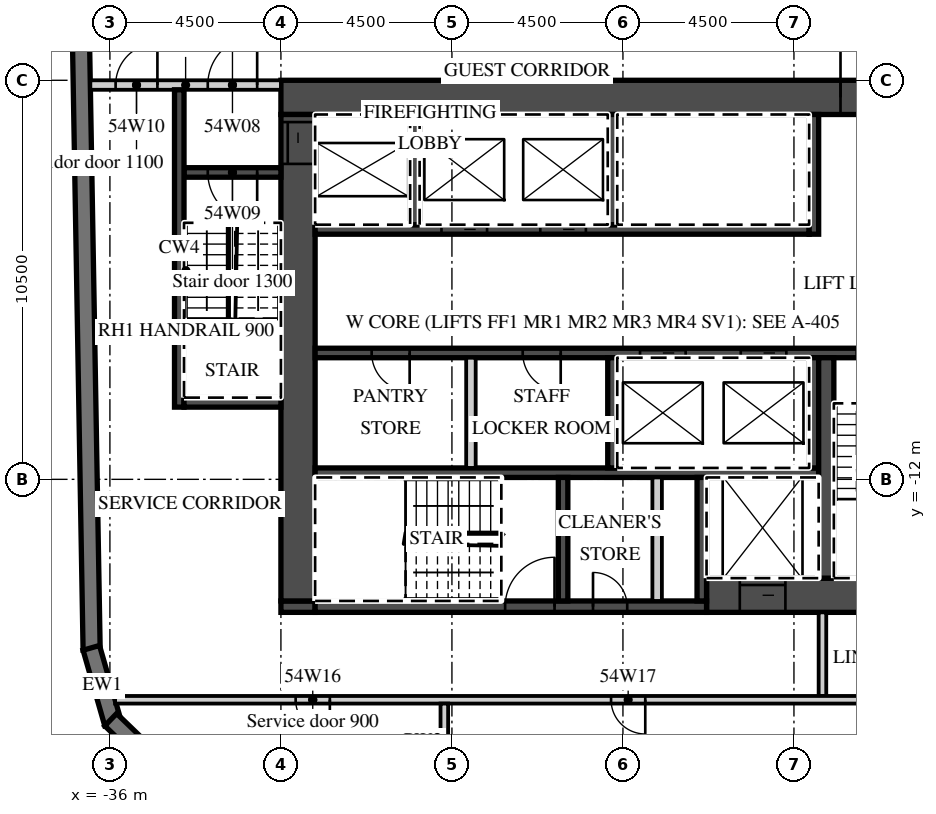
"""IFC4 building model, lengths in metres.
Left out: names, types, materials, properties, quantities, classifications, styles, units other than length and angle.
Written with IfcOpenShell. Run it as: python <this file> out.ifc"""

import sys

from ifc_helpers import new_model, si_unit, direction, frame, frame_2d, origin, place, context, subcontext, project, spatial, polyline, rectangle, outline, extrude, element, fill, save


model = new_model("IFC4")
c1 = context("Model", 3, precision=1e-05, world=origin(), true_north=direction((0.0, 1.0)))
c2 = subcontext(c1, "Body", "Model", "MODEL_VIEW")
j1 = project(units=[si_unit("LENGTHUNIT", "METRE"), si_unit("PLANEANGLEUNIT", "RADIAN")], contexts=[c1])
p1 = place(None, origin())
s1 = spatial("IfcSite", under=j1, at=p1, CompositionType="ELEMENT")
p2 = place(p1, origin())
s2 = spatial("IfcBuilding", under=s1, at=p2, CompositionType="ELEMENT")
p3 = place(p2, frame((0.0, 0.0, 224.3)))
s3 = spatial("IfcBuildingStorey", under=s2, at=p3, CompositionType="ELEMENT", Elevation=224.3)
p4 = place(p3, frame((-37.057, 16.503, 0.0), z_axis=(0.0, 0.0, 1.0), x_axis=(0.017452279857, -0.999847697366, 0.0)))
e1 = element("IfcWall", 1, at=p4, inside=s3, PredefinedType="SOLIDWALL", context=c2, shape_type="SweptSolid", body=[
    extrude(rectangle(XDim=33.0, YDim=0.45, at=frame_2d((16.5, 0.0))), origin(), (0.0, 0.0, 1.0), 3.02),
])
p5 = place(p3, frame((-36.49, -16.434, 0.0), z_axis=(0.0, 0.0, 1.0), x_axis=(0.275577603096, -0.961278827745, 0.0)))
e2 = element("IfcWall", 2, at=p5, inside=s3, PredefinedType="SOLIDWALL", context=c2, shape_type="SweptSolid", body=[
    extrude(outline(polyline([(0.0, -0.225), (2.071, -0.225), (1.95, 0.225), (0.121, 0.225), (0.0, -0.225)])), origin(), (0.0, 0.0, 1.0), 3.02),
])
p6 = place(p3, frame((-35.979, -18.324, 0.0), z_axis=(0.0, 0.0, 1.0), x_axis=(0.719320193998, -0.694678672846, 0.0)))
e3 = element("IfcWall", 3, at=p6, inside=s3, PredefinedType="SOLIDWALL", context=c2, shape_type="SweptSolid", body=[
    extrude(outline(polyline([(0.0, -0.225), (2.071, -0.225), (1.95, 0.225), (0.121, 0.225), (0.0, -0.225)])), origin(), (0.0, 0.0, 1.0), 3.02),
])
p7 = place(p3, frame((-31.5, -1.95, 0.0), z_axis=(0.0, 0.0, 1.0), x_axis=(1.0, 0.0, 0.0)))
e4 = element("IfcWall", 4, at=p7, inside=s3, PredefinedType="SHEAR", context=c2, shape_type="SweptSolid", body=[
    extrude(rectangle(XDim=18.0, YDim=0.9, at=frame_2d((9.0, 0.0))), origin(), (0.0, 0.0, 1.0), 3.02),
])
p8 = place(p7, frame((14.725, 0.0, 0.0)))
e5 = element("IfcOpeningElement", 5, at=p8, cuts=e4, PredefinedType="OPENING", context=c2, shape_type="SweptSolid", body=[
    extrude(rectangle(XDim=1.8, YDim=2.1, at=frame_2d((0.9, 1.05))), frame((0.0, 0.46, 0.0), z_axis=(0.0, -1.0, 0.0), x_axis=(1.0, 0.0, 0.0)), (0.0, 0.0, 1.0), 0.92),
])
p9 = place(p3, frame((-20.3, -15.05, 0.0), z_axis=(0.0, 0.0, 1.0), x_axis=(1.0, 0.0, 0.0)))
e6 = element("IfcWall", 6, at=p9, inside=s3, PredefinedType="SHEAR", context=c2, shape_type="SweptSolid", body=[
    extrude(rectangle(XDim=6.8, YDim=0.9, at=frame_2d((3.4, 0.0))), origin(), (0.0, 0.0, 1.0), 3.02),
])
p10 = place(p9, frame((0.875, 0.0, 0.0)))
e7 = element("IfcOpeningElement", 7, at=p10, cuts=e6, PredefinedType="OPENING", context=c2, shape_type="SweptSolid", body=[
    extrude(rectangle(XDim=1.2, YDim=2.1, at=frame_2d((0.6, 1.05))), frame((0.0, 0.46, 0.0), z_axis=(0.0, -1.0, 0.0), x_axis=(1.0, 0.0, 0.0)), (0.0, 0.0, 1.0), 0.92),
])
p11 = place(p3, frame((-31.5, -15.35, 0.0), z_axis=(0.0, 0.0, 1.0), x_axis=(1.0, 0.0, 0.0)))
e8 = element("IfcWall", 8, at=p11, inside=s3, PredefinedType="SHEAR", context=c2, shape_type="SweptSolid", body=[
    extrude(rectangle(XDim=0.9, YDim=0.3, at=frame_2d((0.45, 0.0))), origin(), (0.0, 0.0, 1.0), 3.02),
])
p12 = place(p3, frame((-30.6, -15.35, 0.0), z_axis=(0.0, 0.0, 1.0), x_axis=(1.0, 0.0, 0.0)))
e9 = element("IfcWall", 9, at=p12, inside=s3, PredefinedType="SHEAR", context=c2, shape_type="SweptSolid", body=[
    extrude(rectangle(XDim=10.3, YDim=0.3, at=frame_2d((5.15, 0.0))), origin(), (0.0, 0.0, 1.0), 3.02),
])
p13 = place(p12, frame((5.0, 0.0, 0.0)))
e10 = element("IfcOpeningElement", 10, at=p13, cuts=e9, PredefinedType="OPENING", context=c2, shape_type="SweptSolid", body=[
    extrude(rectangle(XDim=1.3, YDim=2.1, at=frame_2d((0.65, 1.05))), frame((0.0, 0.16, 0.0), z_axis=(0.0, -1.0, 0.0), x_axis=(1.0, 0.0, 0.0)), (0.0, 0.0, 1.0), 0.32),
])
p14 = place(p12, frame((7.312, 0.0, 0.0)))
e11 = element("IfcOpeningElement", 11, at=p14, cuts=e9, PredefinedType="OPENING", context=c2, shape_type="SweptSolid", body=[
    extrude(rectangle(XDim=0.9, YDim=2.1, at=frame_2d((0.45, 1.05))), frame((0.0, 0.16, 0.0), z_axis=(0.0, -1.0, 0.0), x_axis=(1.0, 0.0, 0.0)), (0.0, 0.0, 1.0), 0.32),
])
p15 = place(p3, frame((-31.05, -15.2, 0.0), z_axis=(0.0, 0.0, 1.0), x_axis=(0.0, 1.0, 0.0)))
e12 = element("IfcWall", 12, at=p15, inside=s3, PredefinedType="SHEAR", context=c2, shape_type="SweptSolid", body=[
    extrude(rectangle(XDim=12.8, YDim=0.9, at=frame_2d((6.4, 0.0))), origin(), (0.0, 0.0, 1.0), 3.02),
])
p16 = place(p15, frame((11.5, 0.0, 0.0)))
e13 = element("IfcOpeningElement", 13, at=p16, cuts=e12, PredefinedType="OPENING", context=c2, shape_type="SweptSolid", body=[
    extrude(rectangle(XDim=1.1, YDim=2.1, at=frame_2d((0.55, 1.05))), frame((0.0, 0.46, 0.0), z_axis=(0.0, -1.0, 0.0), x_axis=(1.0, 0.0, 0.0)), (0.0, 0.0, 1.0), 0.92),
])
p17 = place(p3, frame((-30.6, -5.425, 0.0), z_axis=(0.0, 0.0, 1.0), x_axis=(1.0, 0.0, 0.0)))
e14 = element("IfcWall", 14, at=p17, inside=s3, PredefinedType="SHEAR", context=c2, shape_type="SweptSolid", body=[
    extrude(rectangle(XDim=13.0, YDim=0.25, at=frame_2d((6.5, 0.0))), origin(), (0.0, 0.0, 1.0), 3.02),
])
p18 = place(p17, frame((3.325, 0.0, 0.0)))
e15 = element("IfcOpeningElement", 15, at=p18, cuts=e14, PredefinedType="OPENING", context=c2, shape_type="SweptSolid", body=[
    extrude(rectangle(XDim=1.2, YDim=2.1, at=frame_2d((0.6, 1.05))), frame((0.0, 0.135, 0.0), z_axis=(0.0, -1.0, 0.0), x_axis=(1.0, 0.0, 0.0)), (0.0, 0.0, 1.0), 0.27),
])
p19 = place(p17, frame((5.925, 0.0, 0.0)))
e16 = element("IfcOpeningElement", 16, at=p19, cuts=e14, PredefinedType="OPENING", context=c2, shape_type="SweptSolid", body=[
    extrude(rectangle(XDim=1.2, YDim=2.1, at=frame_2d((0.6, 1.05))), frame((0.0, 0.135, 0.0), z_axis=(0.0, -1.0, 0.0), x_axis=(1.0, 0.0, 0.0)), (0.0, 0.0, 1.0), 0.27),
])
p20 = place(p3, frame((-17.475, -5.55, 0.0), z_axis=(0.0, 0.0, 1.0), x_axis=(0.0, 1.0, 0.0)))
e17 = element("IfcWall", 17, at=p20, inside=s3, PredefinedType="SHEAR", context=c2, shape_type="SweptSolid", body=[
    extrude(rectangle(XDim=3.15, YDim=0.25, at=frame_2d((1.575, 0.0))), origin(), (0.0, 0.0, 1.0), 3.02),
])
for number, where, z_axis, x_axis in (
    (18, (-27.975, -5.3, 0.0), (0.0, 0.0, 1.0), (0.0, 1.0, 0.0)),
    (19, (-22.775, -5.3, 0.0), (0.0, 0.0, 1.0), (0.0, 1.0, 0.0)),
):
    element("IfcWall", number, at=place(p3, frame(where, z_axis=z_axis, x_axis=x_axis)), inside=s3, PredefinedType="SHEAR", context=c2, shape_type="SweptSolid", body=[
        extrude(rectangle(XDim=2.9, YDim=0.25, at=frame_2d((1.45, 0.0))), origin(), (0.0, 0.0, 1.0), 3.02),
    ])
p21 = place(p3, frame((-30.6, -8.675, 0.0), z_axis=(0.0, 0.0, 1.0), x_axis=(1.0, 0.0, 0.0)))
e20 = element("IfcWall", 20, at=p21, inside=s3, PredefinedType="SHEAR", context=c2, shape_type="SweptSolid", body=[
    extrude(rectangle(XDim=16.2, YDim=0.25, at=frame_2d((8.1, 0.0))), origin(), (0.0, 0.0, 1.0), 3.02),
])
p22 = place(p21, frame((8.55, 0.0, 0.0)))
e21 = element("IfcOpeningElement", 21, at=p22, cuts=e20, PredefinedType="OPENING", context=c2, shape_type="SweptSolid", body=[
    extrude(rectangle(XDim=1.2, YDim=2.1, at=frame_2d((0.6, 1.05))), frame((0.0, 0.135, 0.0), z_axis=(0.0, -1.0, 0.0), x_axis=(1.0, 0.0, 0.0)), (0.0, 0.0, 1.0), 0.27),
])
p23 = place(p21, frame((11.2, 0.0, 0.0)))
e22 = element("IfcOpeningElement", 22, at=p23, cuts=e20, PredefinedType="OPENING", context=c2, shape_type="SweptSolid", body=[
    extrude(rectangle(XDim=1.2, YDim=2.1, at=frame_2d((0.6, 1.05))), frame((0.0, 0.135, 0.0), z_axis=(0.0, -1.0, 0.0), x_axis=(1.0, 0.0, 0.0)), (0.0, 0.0, 1.0), 0.27),
])
p24 = place(p21, frame((14.25, 0.0, 0.0)))
e23 = element("IfcOpeningElement", 23, at=p24, cuts=e20, PredefinedType="OPENING", context=c2, shape_type="SweptSolid", body=[
    extrude(rectangle(XDim=1.3, YDim=2.1, at=frame_2d((0.65, 1.05))), frame((0.0, 0.135, 0.0), z_axis=(0.0, -1.0, 0.0), x_axis=(1.0, 0.0, 0.0)), (0.0, 0.0, 1.0), 0.27),
])
p25 = place(p21, frame((1.488, 0.0, 0.0)))
e24 = element("IfcOpeningElement", 24, at=p25, cuts=e20, PredefinedType="OPENING", context=c2, shape_type="SweptSolid", body=[
    extrude(rectangle(XDim=1.0, YDim=2.1, at=frame_2d((0.5, 1.05))), frame((0.0, 0.135, 0.0), z_axis=(0.0, -1.0, 0.0), x_axis=(1.0, 0.0, 0.0)), (0.0, 0.0, 1.0), 0.27),
])
p26 = place(p21, frame((5.462, 0.0, 0.0)))
e25 = element("IfcOpeningElement", 25, at=p26, cuts=e20, PredefinedType="OPENING", context=c2, shape_type="SweptSolid", body=[
    extrude(rectangle(XDim=1.0, YDim=2.1, at=frame_2d((0.5, 1.05))), frame((0.0, 0.135, 0.0), z_axis=(0.0, -1.0, 0.0), x_axis=(1.0, 0.0, 0.0)), (0.0, 0.0, 1.0), 0.27),
])
p27 = place(p3, frame((-30.6, -11.825, 0.0), z_axis=(0.0, 0.0, 1.0), x_axis=(1.0, 0.0, 0.0)))
e26 = element("IfcWall", 26, at=p27, inside=s3, PredefinedType="SHEAR", context=c2, shape_type="SweptSolid", body=[
    extrude(rectangle(XDim=13.25, YDim=0.25, at=frame_2d((6.625, 0.0))), origin(), (0.0, 0.0, 1.0), 3.02),
])
for number, where, z_axis, x_axis in (
    (27, (-17.475, -11.7, 0.0), (0.0, 0.0, 1.0), (0.0, 1.0, 0.0)),
    (28, (-22.775, -11.7, 0.0), (0.0, 0.0, 1.0), (0.0, 1.0, 0.0)),
):
    element("IfcWall", number, at=place(p3, frame(where, z_axis=z_axis, x_axis=x_axis)), inside=s3, PredefinedType="SHEAR", context=c2, shape_type="SweptSolid", body=[
        extrude(rectangle(XDim=2.9, YDim=0.25, at=frame_2d((1.45, 0.0))), origin(), (0.0, 0.0, 1.0), 3.02),
    ])
p28 = place(p3, frame((-26.5, -11.7, 0.0), z_axis=(0.0, 0.0, 1.0), x_axis=(0.0, 1.0, 0.0)))
e29 = element("IfcWall", 29, at=p28, inside=s3, PredefinedType="PARTITIONING", context=c2, shape_type="SweptSolid", body=[
    extrude(rectangle(XDim=2.9, YDim=0.25, at=frame_2d((1.45, 0.0))), origin(), (0.0, 0.0, 1.0), 3.02),
])
p29 = place(p3, frame((-17.15, -14.6, 0.0), z_axis=(0.0, 0.0, 1.0), x_axis=(0.0, 1.0, 0.0)))
e30 = element("IfcWall", 30, at=p29, inside=s3, PredefinedType="SHEAR", context=c2, shape_type="SweptSolid", body=[
    extrude(rectangle(XDim=5.8, YDim=0.4, at=frame_2d((2.9, 0.0))), origin(), (0.0, 0.0, 1.0), 3.02),
])
for number, where, z_axis, x_axis in (
    (31, (-20.425, -15.2, 0.0), (0.0, 0.0, 1.0), (0.0, 1.0, 0.0)),
    (32, (-24.075, -15.2, 0.0), (0.0, 0.0, 1.0), (0.0, 1.0, 0.0)),
):
    element("IfcWall", number, at=place(p3, frame(where, z_axis=z_axis, x_axis=x_axis)), inside=s3, PredefinedType="SHEAR", context=c2, shape_type="SweptSolid", body=[
        extrude(rectangle(XDim=3.25, YDim=0.25, at=frame_2d((1.625, 0.0))), origin(), (0.0, 0.0, 1.0), 3.02),
    ])
p30 = place(p3, frame((-21.6, -15.2, 0.0), z_axis=(0.0, 0.0, 1.0), x_axis=(0.0, 1.0, 0.0)))
e33 = element("IfcWall", 33, at=p30, inside=s3, PredefinedType="PARTITIONING", context=c2, shape_type="SweptSolid", body=[
    extrude(rectangle(XDim=3.25, YDim=0.25, at=frame_2d((1.625, 0.0))), origin(), (0.0, 0.0, 1.0), 3.02),
])
p31 = place(p3, frame((-36.515, -1.625, 0.0), z_axis=(0.0, 0.0, 1.0), x_axis=(1.0, 0.0, 0.0)))
e34 = element("IfcWall", 34, at=p31, inside=s3, PredefinedType="PARTITIONING", context=c2, shape_type="SweptSolid", body=[
    extrude(rectangle(XDim=5.015, YDim=0.25, at=frame_2d((2.508, 0.0))), origin(), (0.0, 0.0, 1.0), 3.02),
])
p32 = place(p31, frame((3.09, 0.0, 0.0)))
e35 = element("IfcOpeningElement", 35, at=p32, cuts=e34, PredefinedType="OPENING", context=c2, shape_type="SweptSolid", body=[
    extrude(rectangle(XDim=1.3, YDim=2.1, at=frame_2d((0.65, 1.05))), frame((0.0, 0.135, 0.0), z_axis=(0.0, -1.0, 0.0), x_axis=(1.0, 0.0, 0.0)), (0.0, 0.0, 1.0), 0.27),
])
p33 = place(p31, frame((0.665, 0.0, 0.0)))
e36 = element("IfcOpeningElement", 36, at=p33, cuts=e34, PredefinedType="OPENING", context=c2, shape_type="SweptSolid", body=[
    extrude(rectangle(XDim=1.1, YDim=2.1, at=frame_2d((0.55, 1.05))), frame((0.0, 0.135, 0.0), z_axis=(0.0, -1.0, 0.0), x_axis=(1.0, 0.0, 0.0)), (0.0, 0.0, 1.0), 0.27),
])
p34 = place(p3, frame((-34.05, -3.925, 0.0), z_axis=(0.0, 0.0, 1.0), x_axis=(1.0, 0.0, 0.0)))
e37 = element("IfcWall", 37, at=p34, inside=s3, PredefinedType="SHEAR", context=c2, shape_type="SweptSolid", body=[
    extrude(rectangle(XDim=2.55, YDim=0.25, at=frame_2d((1.275, 0.0))), origin(), (0.0, 0.0, 1.0), 3.02),
])
p35 = place(p34, frame((0.625, 0.0, 0.0)))
e38 = element("IfcOpeningElement", 38, at=p35, cuts=e37, PredefinedType="OPENING", context=c2, shape_type="SweptSolid", body=[
    extrude(rectangle(XDim=1.3, YDim=2.1, at=frame_2d((0.65, 1.05))), frame((0.0, 0.135, 0.0), z_axis=(0.0, -1.0, 0.0), x_axis=(1.0, 0.0, 0.0)), (0.0, 0.0, 1.0), 0.27),
])
p36 = place(p3, frame((-34.175, -10.1, 0.0), z_axis=(0.0, 0.0, 1.0), x_axis=(0.0, 1.0, 0.0)))
e39 = element("IfcWall", 39, at=p36, inside=s3, PredefinedType="SHEAR", context=c2, shape_type="SweptSolid", body=[
    extrude(rectangle(XDim=8.35, YDim=0.25, at=frame_2d((4.175, 0.0))), origin(), (0.0, 0.0, 1.0), 3.02),
])
p37 = place(p3, frame((-34.05, -9.975, 0.0), z_axis=(0.0, 0.0, 1.0), x_axis=(1.0, 0.0, 0.0)))
e40 = element("IfcWall", 40, at=p37, inside=s3, PredefinedType="SHEAR", context=c2, shape_type="SweptSolid", body=[
    extrude(rectangle(XDim=2.55, YDim=0.25, at=frame_2d((1.275, 0.0))), origin(), (0.0, 0.0, 1.0), 3.02),
])
p38 = place(p3, frame((-17.25, -17.7, 0.0), z_axis=(0.0, 0.0, 1.0), x_axis=(0.0, 1.0, 0.0)))
e41 = element("IfcWall", 41, at=p38, inside=s3, PredefinedType="PARTITIONING", context=c2, shape_type="SweptSolid", body=[
    extrude(rectangle(XDim=2.2, YDim=0.2, at=frame_2d((1.1, 0.0))), origin(), (0.0, 0.0, 1.0), 3.02),
])
p39 = place(p3, frame((-35.864, -17.8, 0.0), z_axis=(0.0, 0.0, 1.0), x_axis=(1.0, 0.0, 0.0)))
e42 = element("IfcWall", 42, at=p39, inside=s3, PredefinedType="PARTITIONING", context=c2, shape_type="SweptSolid", body=[
    extrude(rectangle(XDim=22.264, YDim=0.2, at=frame_2d((11.132, 0.0))), origin(), (0.0, 0.0, 1.0), 3.02),
])
p40 = place(p39, frame((4.751, 0.0, 0.0)))
e43 = element("IfcOpeningElement", 43, at=p40, cuts=e42, PredefinedType="OPENING", context=c2, shape_type="SweptSolid", body=[
    extrude(rectangle(XDim=0.9, YDim=2.1, at=frame_2d((0.45, 1.05))), frame((0.0, 0.11, 0.0), z_axis=(0.0, -1.0, 0.0), x_axis=(1.0, 0.0, 0.0)), (0.0, 0.0, 1.0), 0.22),
])
p41 = place(p39, frame((13.051, 0.0, 0.0)))
e44 = element("IfcOpeningElement", 44, at=p41, cuts=e42, PredefinedType="OPENING", context=c2, shape_type="SweptSolid", body=[
    extrude(rectangle(XDim=0.9, YDim=2.1, at=frame_2d((0.45, 1.05))), frame((0.0, 0.11, 0.0), z_axis=(0.0, -1.0, 0.0), x_axis=(1.0, 0.0, 0.0)), (0.0, 0.0, 1.0), 0.22),
])
p42 = place(p3, frame((-27.2, -19.88, 0.0), z_axis=(0.0, 0.0, 1.0), x_axis=(0.0, 1.0, 0.0)))
e45 = element("IfcWall", 45, at=p42, inside=s3, PredefinedType="PARTITIONING", context=c2, shape_type="SweptSolid", body=[
    extrude(rectangle(XDim=1.98, YDim=0.2, at=frame_2d((0.99, 0.0))), origin(), (0.0, 0.0, 1.0), 3.02),
])
p43 = place(p22, origin())
e46 = element("IfcDoor", 46, at=p43, inside=s3, OperationType="SLIDING_TO_LEFT", PredefinedType="DOOR", context=c2, shape_type="SweptSolid", body=[
    extrude(rectangle(XDim=1.2, YDim=2.1, at=frame_2d((0.6, 1.05))), frame((0.0, 0.025, 0.0), z_axis=(0.0, -1.0, 0.0), x_axis=(1.0, 0.0, 0.0)), (0.0, 0.0, 1.0), 0.05),
])
fill(e21, e46)
p44 = place(p23, origin())
e47 = element("IfcDoor", 47, at=p44, inside=s3, OperationType="SLIDING_TO_RIGHT", PredefinedType="DOOR", context=c2, shape_type="SweptSolid", body=[
    extrude(rectangle(XDim=1.2, YDim=2.1, at=frame_2d((0.6, 1.05))), frame((0.0, 0.025, 0.0), z_axis=(0.0, -1.0, 0.0), x_axis=(1.0, 0.0, 0.0)), (0.0, 0.0, 1.0), 0.05),
])
fill(e22, e47)
p45 = place(p18, origin())
e48 = element("IfcDoor", 48, at=p45, inside=s3, OperationType="SLIDING_TO_RIGHT", PredefinedType="DOOR", context=c2, shape_type="SweptSolid", body=[
    extrude(rectangle(XDim=1.2, YDim=2.1, at=frame_2d((0.6, 1.05))), frame((0.0, 0.025, 0.0), z_axis=(0.0, -1.0, 0.0), x_axis=(1.0, 0.0, 0.0)), (0.0, 0.0, 1.0), 0.05),
])
fill(e15, e48)
p46 = place(p19, origin())
e49 = element("IfcDoor", 49, at=p46, inside=s3, OperationType="SLIDING_TO_RIGHT", PredefinedType="DOOR", context=c2, shape_type="SweptSolid", body=[
    extrude(rectangle(XDim=1.2, YDim=2.1, at=frame_2d((0.6, 1.05))), frame((0.0, 0.025, 0.0), z_axis=(0.0, -1.0, 0.0), x_axis=(1.0, 0.0, 0.0)), (0.0, 0.0, 1.0), 0.05),
])
fill(e16, e49)
p47 = place(p10, origin())
e50 = element("IfcDoor", 50, at=p47, inside=s3, OperationType="SLIDING_TO_LEFT", PredefinedType="DOOR", context=c2, shape_type="SweptSolid", body=[
    extrude(rectangle(XDim=1.2, YDim=2.1, at=frame_2d((0.6, 1.05))), frame((0.0, 0.025, 0.0), z_axis=(0.0, -1.0, 0.0), x_axis=(1.0, 0.0, 0.0)), (0.0, 0.0, 1.0), 0.05),
])
fill(e7, e50)
p48 = place(p16, origin())
e51 = element("IfcDoor", 51, at=p48, inside=s3, OperationType="SLIDING_TO_RIGHT", PredefinedType="DOOR", context=c2, shape_type="SweptSolid", body=[
    extrude(rectangle(XDim=1.1, YDim=2.1, at=frame_2d((0.55, 1.05))), frame((0.0, 0.025, 0.0), z_axis=(0.0, -1.0, 0.0), x_axis=(1.0, 0.0, 0.0)), (0.0, 0.0, 1.0), 0.05),
])
fill(e13, e51)
p49 = place(p8, origin())
e52 = element("IfcDoor", 52, at=p49, inside=s3, OperationType="DOUBLE_DOOR_DOUBLE_SWING", PredefinedType="DOOR", context=c2, shape_type="SweptSolid", body=[
    extrude(rectangle(XDim=1.8, YDim=2.1, at=frame_2d((0.9, 1.05))), frame((0.0, 0.025, 0.0), z_axis=(0.0, -1.0, 0.0), x_axis=(1.0, 0.0, 0.0)), (0.0, 0.0, 1.0), 0.05),
])
fill(e5, e52)
p50 = place(p32, origin())
e53 = element("IfcDoor", 53, at=p50, inside=s3, OperationType="SINGLE_SWING_RIGHT", PredefinedType="DOOR", context=c2, shape_type="SweptSolid", body=[
    extrude(rectangle(XDim=1.3, YDim=2.1, at=frame_2d((0.65, 1.05))), frame((0.0, 0.025, 0.0), z_axis=(0.0, -1.0, 0.0), x_axis=(1.0, 0.0, 0.0)), (0.0, 0.0, 1.0), 0.05),
])
fill(e35, e53)
p51 = place(p35, origin())
e54 = element("IfcDoor", 54, at=p51, inside=s3, OperationType="SINGLE_SWING_RIGHT", PredefinedType="DOOR", context=c2, shape_type="SweptSolid", body=[
    extrude(rectangle(XDim=1.3, YDim=2.1, at=frame_2d((0.65, 1.05))), frame((0.0, 0.025, 0.0), z_axis=(0.0, -1.0, 0.0), x_axis=(1.0, 0.0, 0.0)), (0.0, 0.0, 1.0), 0.05),
])
fill(e38, e54)
p52 = place(p33, origin())
e55 = element("IfcDoor", 55, at=p52, inside=s3, OperationType="SINGLE_SWING_RIGHT", PredefinedType="DOOR", context=c2, shape_type="SweptSolid", body=[
    extrude(rectangle(XDim=1.1, YDim=2.1, at=frame_2d((0.55, 1.05))), frame((0.0, 0.025, 0.0), z_axis=(0.0, -1.0, 0.0), x_axis=(1.0, 0.0, 0.0)), (0.0, 0.0, 1.0), 0.05),
])
fill(e36, e55)
p53 = place(p24, origin())
e56 = element("IfcDoor", 56, at=p53, inside=s3, OperationType="SINGLE_SWING_RIGHT", PredefinedType="DOOR", context=c2, shape_type="SweptSolid", body=[
    extrude(rectangle(XDim=1.3, YDim=2.1, at=frame_2d((0.65, 1.05))), frame((0.0, 0.025, 0.0), z_axis=(0.0, -1.0, 0.0), x_axis=(1.0, 0.0, 0.0)), (0.0, 0.0, 1.0), 0.05),
])
fill(e23, e56)
p54 = place(p13, origin())
e57 = element("IfcDoor", 57, at=p54, inside=s3, OperationType="SINGLE_SWING_RIGHT", PredefinedType="DOOR", context=c2, shape_type="SweptSolid", body=[
    extrude(rectangle(XDim=1.3, YDim=2.1, at=frame_2d((0.65, 1.05))), frame((0.0, 0.025, 0.0), z_axis=(0.0, -1.0, 0.0), x_axis=(1.0, 0.0, 0.0)), (0.0, 0.0, 1.0), 0.05),
])
fill(e10, e57)
p55 = place(p14, origin())
e58 = element("IfcDoor", 58, at=p55, inside=s3, OperationType="SINGLE_SWING_LEFT", PredefinedType="DOOR", context=c2, shape_type="SweptSolid", body=[
    extrude(rectangle(XDim=0.9, YDim=2.1, at=frame_2d((0.45, 1.05))), frame((0.0, 0.025, 0.0), z_axis=(0.0, -1.0, 0.0), x_axis=(1.0, 0.0, 0.0)), (0.0, 0.0, 1.0), 0.05),
])
fill(e11, e58)
p56 = place(p25, origin())
e59 = element("IfcDoor", 59, at=p56, inside=s3, OperationType="SINGLE_SWING_RIGHT", PredefinedType="DOOR", context=c2, shape_type="SweptSolid", body=[
    extrude(rectangle(XDim=1.0, YDim=2.1, at=frame_2d((0.5, 1.05))), frame((0.0, 0.025, 0.0), z_axis=(0.0, -1.0, 0.0), x_axis=(1.0, 0.0, 0.0)), (0.0, 0.0, 1.0), 0.05),
])
fill(e24, e59)
p57 = place(p26, origin())
e60 = element("IfcDoor", 60, at=p57, inside=s3, OperationType="SINGLE_SWING_RIGHT", PredefinedType="DOOR", context=c2, shape_type="SweptSolid", body=[
    extrude(rectangle(XDim=1.0, YDim=2.1, at=frame_2d((0.5, 1.05))), frame((0.0, 0.025, 0.0), z_axis=(0.0, -1.0, 0.0), x_axis=(1.0, 0.0, 0.0)), (0.0, 0.0, 1.0), 0.05),
])
fill(e25, e60)
p58 = place(p40, origin())
e61 = element("IfcDoor", 61, at=p58, inside=s3, OperationType="SINGLE_SWING_RIGHT", PredefinedType="DOOR", context=c2, shape_type="SweptSolid", body=[
    extrude(rectangle(XDim=0.9, YDim=2.1, at=frame_2d((0.45, 1.05))), frame((0.0, 0.025, 0.0), z_axis=(0.0, -1.0, 0.0), x_axis=(1.0, 0.0, 0.0)), (0.0, 0.0, 1.0), 0.05),
])
fill(e43, e61)
p59 = place(p41, origin())
e62 = element("IfcDoor", 62, at=p59, inside=s3, OperationType="SINGLE_SWING_RIGHT", PredefinedType="DOOR", context=c2, shape_type="SweptSolid", body=[
    extrude(rectangle(XDim=0.9, YDim=2.1, at=frame_2d((0.45, 1.05))), frame((0.0, 0.025, 0.0), z_axis=(0.0, -1.0, 0.0), x_axis=(1.0, 0.0, 0.0)), (0.0, 0.0, 1.0), 0.05),
])
fill(e44, e62)
save(model, sys.argv[1])
